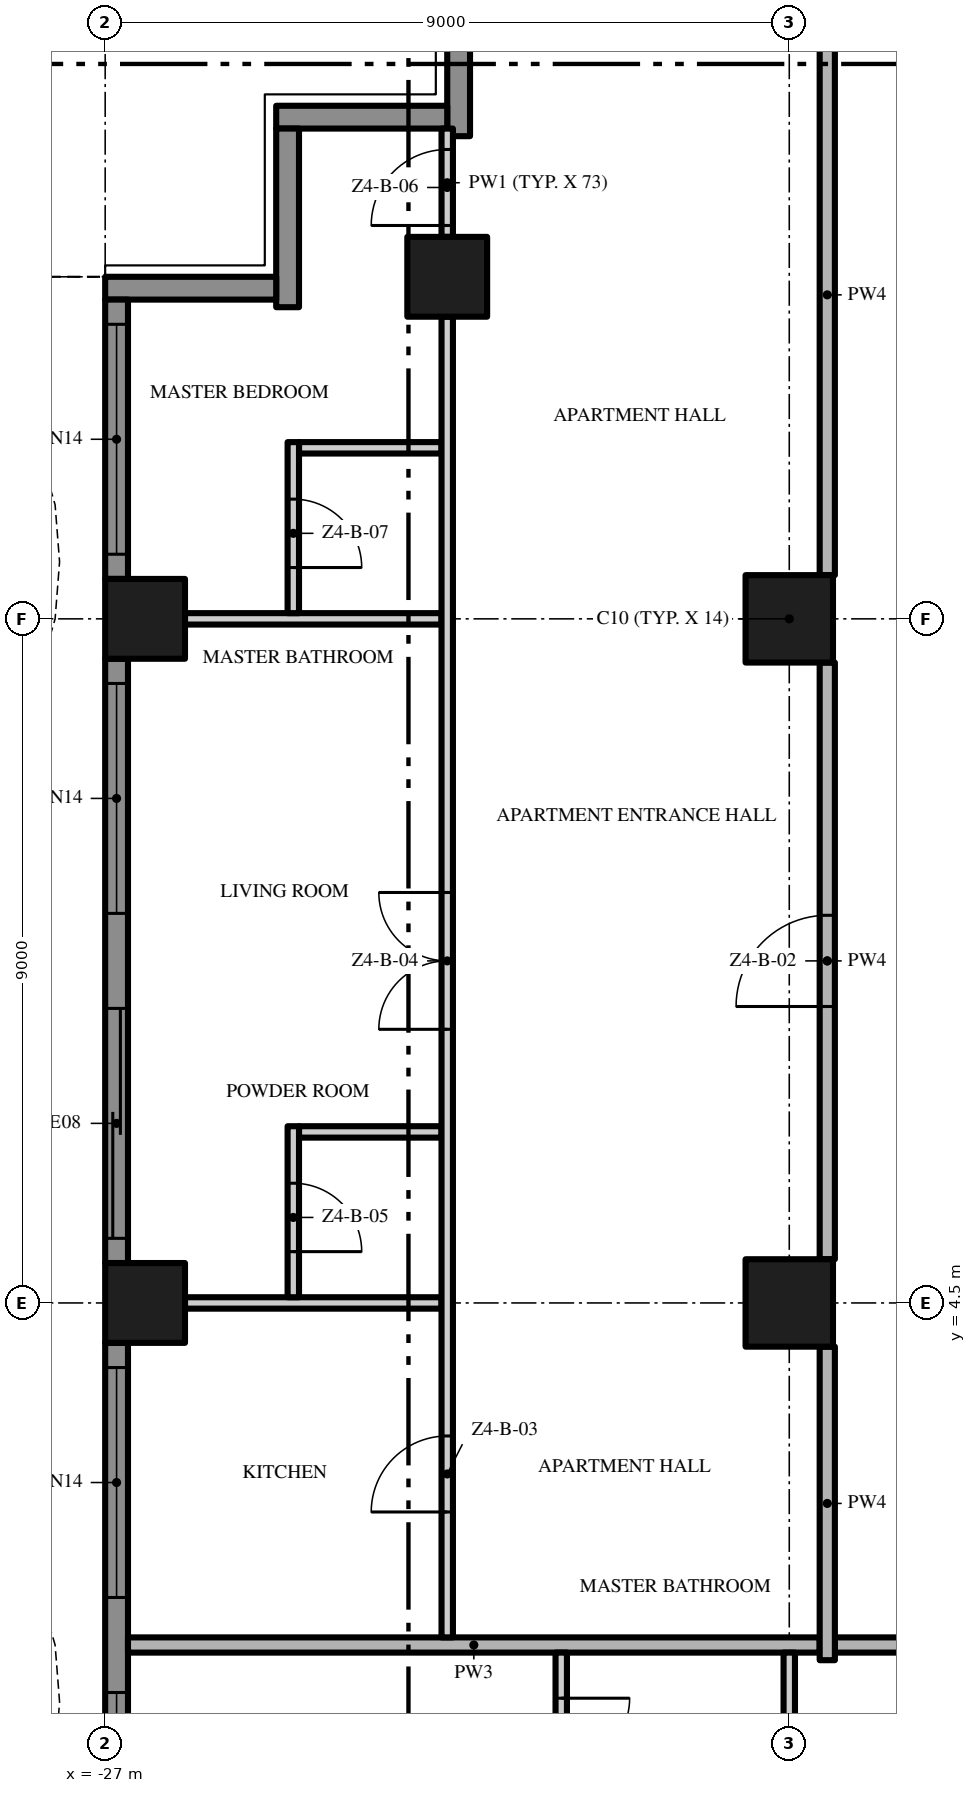
"""IFC4 building model, lengths in metres.
Left out: names, types, materials, properties, quantities, classifications, styles, units other than length and angle.
Written with IfcOpenShell. Run it as: python <this file> out.ifc"""

import sys

from ifc_helpers import new_model, si_unit, direction, frame, frame_2d, origin, origin_2d, place, context, subcontext, project, spatial, polyline, rectangle, outline, extrude, element, fill, save


model = new_model("IFC4")
c1 = context("Model", 3, precision=1e-05, world=origin(), true_north=direction((0.0, 1.0)))
c2 = subcontext(c1, "Body", "Model", "MODEL_VIEW")
j1 = project(units=[si_unit("LENGTHUNIT", "METRE"), si_unit("PLANEANGLEUNIT", "RADIAN")], contexts=[c1])
p1 = place(None, origin())
s1 = spatial("IfcSite", under=j1, at=p1, CompositionType="ELEMENT")
p2 = place(p1, origin())
s2 = spatial("IfcBuilding", under=s1, at=p2, CompositionType="ELEMENT")
p3 = place(p2, frame((0.0, 0.0, 195.8)))
s3 = spatial("IfcBuildingStorey", under=s2, at=p3, CompositionType="ELEMENT", Elevation=195.8)
for number, where, z_axis, x_axis in (
    (1, (-18.0, 13.5, 0.0), (0.0, 0.0, 1.0), (1.0, 0.0, 0.0)),
    (2, (-18.0, 4.5, 0.0), (0.0, 0.0, 1.0), (1.0, 0.0, 0.0)),
):
    element("IfcColumn", number, at=place(p3, frame(where, z_axis=z_axis, x_axis=x_axis)), inside=s3, PredefinedType="COLUMN", context=c2, shape_type="SweptSolid", body=[
        extrude(rectangle(XDim=1.15, YDim=1.15, at=origin_2d()), origin(), (0.0, 0.0, 1.0), 3.5),
    ])
for number, where, z_axis, x_axis in (
    (3, (-26.475, 13.5, 0.0), (0.0, 0.0, 1.0), (1.0, 0.0, 0.0)),
    (4, (-22.5, 18.0, 0.0), (0.0, 0.0, 1.0), (1.0, 0.0, 0.0)),
    (5, (-26.475, 4.5, 0.0), (0.0, 0.0, 1.0), (1.0, 0.0, 0.0)),
):
    element("IfcColumn", number, at=place(p3, frame(where, z_axis=z_axis, x_axis=x_axis)), inside=s3, PredefinedType="COLUMN", context=c2, shape_type="SweptSolid", body=[
        extrude(rectangle(XDim=1.05, YDim=1.05, at=origin_2d()), origin(), (0.0, 0.0, 1.0), 3.5),
    ])
p4 = place(p3, frame((-22.35, 19.85, 0.0), z_axis=(0.0, 0.0, 1.0), x_axis=(0.0, 1.0, 0.0)))
e6 = element("IfcWall", 6, at=p4, inside=s3, PredefinedType="SOLIDWALL", context=c2, shape_type="SweptSolid", body=[
    extrude(rectangle(XDim=2.35, YDim=0.3, at=frame_2d((1.175, 0.0))), origin(), (0.0, 0.0, 1.0), 3.5),
])
p5 = place(p3, frame((-24.75, 20.1, 0.0), z_axis=(0.0, 0.0, 1.0), x_axis=(1.0, 0.0, 0.0)))
e7 = element("IfcWall", 7, at=p5, inside=s3, PredefinedType="SOLIDWALL", context=c2, shape_type="SweptSolid", body=[
    extrude(rectangle(XDim=2.25, YDim=0.3, at=frame_2d((1.125, 0.0))), origin(), (0.0, 0.0, 1.0), 3.5),
])
p6 = place(p3, frame((-24.6, 17.6, 0.0), z_axis=(0.0, 0.0, 1.0), x_axis=(0.0, 1.0, 0.0)))
e8 = element("IfcWall", 8, at=p6, inside=s3, PredefinedType="SOLIDWALL", context=c2, shape_type="SweptSolid", body=[
    extrude(rectangle(XDim=2.35, YDim=0.3, at=frame_2d((1.175, 0.0))), origin(), (0.0, 0.0, 1.0), 3.5),
])
p7 = place(p3, frame((-27.0, 17.85, 0.0), z_axis=(0.0, 0.0, 1.0), x_axis=(1.0, 0.0, 0.0)))
e9 = element("IfcWall", 9, at=p7, inside=s3, PredefinedType="SOLIDWALL", context=c2, shape_type="SweptSolid", body=[
    extrude(rectangle(XDim=2.25, YDim=0.3, at=frame_2d((1.125, 0.0))), origin(), (0.0, 0.0, 1.0), 3.5),
])
p8 = place(p3, frame((-26.85, 14.025, 0.0), z_axis=(0.0, 0.0, 1.0), x_axis=(0.0, 1.0, 0.0)))
e10 = element("IfcWall", 10, at=p8, inside=s3, PredefinedType="SOLIDWALL", context=c2, shape_type="SweptSolid", body=[
    extrude(rectangle(XDim=3.675, YDim=0.3, at=frame_2d((1.837, 0.0))), origin(), (0.0, 0.0, 1.0), 3.5),
])
p9 = place(p8, frame((0.325, 0.0, 0.45)))
e11 = element("IfcOpeningElement", 11, at=p9, cuts=e10, PredefinedType="OPENING", context=c2, shape_type="SweptSolid", body=[
    extrude(rectangle(XDim=3.025, YDim=2.65, at=frame_2d((1.512, 1.325))), frame((0.0, 0.16, 0.0), z_axis=(0.0, -1.0, 0.0), x_axis=(1.0, 0.0, 0.0)), (0.0, 0.0, 1.0), 0.32),
])
p10 = place(p3, frame((-26.85, 5.025, 0.0), z_axis=(0.0, 0.0, 1.0), x_axis=(0.0, 1.0, 0.0)))
e12 = element("IfcWall", 12, at=p10, inside=s3, PredefinedType="SOLIDWALL", context=c2, shape_type="SweptSolid", body=[
    extrude(rectangle(XDim=7.95, YDim=0.3, at=frame_2d((3.975, 0.0))), origin(), (0.0, 0.0, 1.0), 3.5),
])
p11 = place(p10, frame((4.6, 0.0, 0.45)))
e13 = element("IfcOpeningElement", 13, at=p11, cuts=e12, PredefinedType="OPENING", context=c2, shape_type="SweptSolid", body=[
    extrude(rectangle(XDim=3.025, YDim=2.65, at=frame_2d((1.512, 1.325))), frame((0.0, 0.16, 0.0), z_axis=(0.0, -1.0, 0.0), x_axis=(1.0, 0.0, 0.0)), (0.0, 0.0, 1.0), 0.32),
])
p12 = place(p10, frame((0.325, 0.0, 0.0)))
e14 = element("IfcOpeningElement", 14, at=p12, cuts=e12, PredefinedType="OPENING", context=c2, shape_type="SweptSolid", body=[
    extrude(rectangle(XDim=3.025, YDim=2.4, at=frame_2d((1.512, 1.2))), frame((0.0, 0.16, 0.0), z_axis=(0.0, -1.0, 0.0), x_axis=(1.0, 0.0, 0.0)), (0.0, 0.0, 1.0), 0.32),
])
p13 = place(p3, frame((-26.85, -3.975, 0.0), z_axis=(0.0, 0.0, 1.0), x_axis=(0.0, 1.0, 0.0)))
e15 = element("IfcWall", 15, at=p13, inside=s3, PredefinedType="SOLIDWALL", context=c2, shape_type="SweptSolid", body=[
    extrude(rectangle(XDim=7.95, YDim=0.3, at=frame_2d((3.975, 0.0))), origin(), (0.0, 0.0, 1.0), 3.5),
])
p14 = place(p13, frame((4.6, 0.0, 0.45)))
e16 = element("IfcOpeningElement", 16, at=p14, cuts=e15, PredefinedType="OPENING", context=c2, shape_type="SweptSolid", body=[
    extrude(rectangle(XDim=3.025, YDim=2.65, at=frame_2d((1.512, 1.325))), frame((0.0, 0.16, 0.0), z_axis=(0.0, -1.0, 0.0), x_axis=(1.0, 0.0, 0.0)), (0.0, 0.0, 1.0), 0.32),
])
p15 = place(p13, frame((0.325, 0.0, 0.45)))
e17 = element("IfcOpeningElement", 17, at=p15, cuts=e15, PredefinedType="OPENING", context=c2, shape_type="SweptSolid", body=[
    extrude(rectangle(XDim=3.025, YDim=2.65, at=frame_2d((1.512, 1.325))), frame((0.0, 0.16, 0.0), z_axis=(0.0, -1.0, 0.0), x_axis=(1.0, 0.0, 0.0)), (0.0, 0.0, 1.0), 0.32),
])
p16 = place(p3, origin())
e18 = element("IfcWall", 18, at=p16, inside=s3, PredefinedType="USERDEFINED", context=c2, shape_type="SweptSolid", body=[
    extrude(outline(polyline([(-28.8, 18.0), (-28.095, 16.5), (-27.659, 15.0), (-27.6, 14.25), (-27.659, 13.5), (-28.095, 12.0), (-28.8, 10.5), (-29.505, 9.0), (-29.941, 7.5), (-30.0, 6.75), (-29.941, 6.0), (-29.505, 4.5), (-28.8, 3.0), (-28.095, 1.5), (-27.659, 0.0), (-27.6, -0.75), (-27.659, -1.5), (-28.095, -3.0), (-28.8, -4.5), (-29.505, -6.0), (-29.941, -7.5), (-30.0, -8.25), (-29.941, -9.0), (-29.505, -10.5), (-28.8, -12.0), (-28.095, -13.5), (-27.659, -15.0), (-27.6, -15.75), (-27.659, -16.5), (-28.095, -18.0), (-27.855, -18.07), (-27.411, -16.545), (-27.349, -15.75), (-27.411, -14.955), (-27.86, -13.411), (-28.574, -11.894), (-29.271, -10.411), (-29.694, -8.955), (-29.749, -8.25), (-29.694, -7.545), (-29.271, -6.089), (-28.574, -4.606), (-27.86, -3.089), (-27.411, -1.545), (-27.349, -0.75), (-27.411, 0.045), (-27.86, 1.589), (-28.574, 3.106), (-29.271, 4.589), (-29.694, 6.045), (-29.749, 6.75), (-29.694, 7.455), (-29.271, 8.911), (-28.574, 10.394), (-27.86, 11.911), (-27.411, 13.455), (-27.349, 14.25), (-27.411, 15.045), (-27.86, 16.589), (-28.574, 18.106), (-28.8, 18.0)])), origin(), (0.0, 0.0, 1.0), 0.9),
])
p17 = place(p3, frame((-17.4, 0.0, 0.0), z_axis=(0.0, 0.0, 1.0), x_axis=(1.0, 0.0, 0.0)))
e19 = element("IfcWall", 19, at=p17, inside=s3, PredefinedType="PARTITIONING", context=c2, shape_type="SweptSolid", body=[
    extrude(rectangle(XDim=12.8, YDim=0.2, at=frame_2d((6.4, 0.0))), origin(), (0.0, 0.0, 1.0), 3.5),
])
p18 = place(p3, frame((-26.7, 0.0, 0.0), z_axis=(0.0, 0.0, 1.0), x_axis=(1.0, 0.0, 0.0)))
e20 = element("IfcWall", 20, at=p18, inside=s3, PredefinedType="PARTITIONING", context=c2, shape_type="SweptSolid", body=[
    extrude(rectangle(XDim=9.1, YDim=0.2, at=frame_2d((4.55, 0.0))), origin(), (0.0, 0.0, 1.0), 3.5),
])
p19 = place(p3, frame((-25.95, 4.5, 0.0), z_axis=(0.0, 0.0, 1.0), x_axis=(1.0, 0.0, 0.0)))
e21 = element("IfcWall", 21, at=p19, inside=s3, PredefinedType="PARTITIONING", context=c2, shape_type="SweptSolid", body=[
    extrude(rectangle(XDim=3.375, YDim=0.15, at=frame_2d((1.688, 0.0))), origin(), (0.0, 0.0, 1.0), 3.5),
])
p20 = place(p3, frame((-24.45, 6.75, 0.0), z_axis=(0.0, 0.0, 1.0), x_axis=(1.0, 0.0, 0.0)))
e22 = element("IfcWall", 22, at=p20, inside=s3, PredefinedType="PARTITIONING", context=c2, shape_type="SweptSolid", body=[
    extrude(rectangle(XDim=1.875, YDim=0.15, at=frame_2d((0.938, 0.0))), origin(), (0.0, 0.0, 1.0), 3.5),
])
p21 = place(p3, frame((-25.95, 13.5, 0.0), z_axis=(0.0, 0.0, 1.0), x_axis=(1.0, 0.0, 0.0)))
e23 = element("IfcWall", 23, at=p21, inside=s3, PredefinedType="PARTITIONING", context=c2, shape_type="SweptSolid", body=[
    extrude(rectangle(XDim=3.375, YDim=0.15, at=frame_2d((1.688, 0.0))), origin(), (0.0, 0.0, 1.0), 3.5),
])
p22 = place(p3, frame((-24.45, 15.75, 0.0), z_axis=(0.0, 0.0, 1.0), x_axis=(1.0, 0.0, 0.0)))
e24 = element("IfcWall", 24, at=p22, inside=s3, PredefinedType="PARTITIONING", context=c2, shape_type="SweptSolid", body=[
    extrude(rectangle(XDim=1.875, YDim=0.15, at=frame_2d((0.938, 0.0))), origin(), (0.0, 0.0, 1.0), 3.5),
])
p23 = place(p3, frame((-24.525, 6.825, 0.0), z_axis=(0.0, 0.0, 1.0), x_axis=(0.0, -1.0, 0.0)))
e25 = element("IfcWall", 25, at=p23, inside=s3, PredefinedType="PARTITIONING", context=c2, shape_type="SweptSolid", body=[
    extrude(rectangle(XDim=2.25, YDim=0.15, at=frame_2d((1.125, 0.0))), origin(), (0.0, 0.0, 1.0), 3.5),
])
p24 = place(p23, frame((0.75, 0.0, 0.0)))
e26 = element("IfcOpeningElement", 26, at=p24, cuts=e25, PredefinedType="OPENING", context=c2, shape_type="SweptSolid", body=[
    extrude(rectangle(XDim=0.9, YDim=2.1, at=frame_2d((0.45, 1.05))), frame((0.0, 0.085, 0.0), z_axis=(0.0, -1.0, 0.0), x_axis=(1.0, 0.0, 0.0)), (0.0, 0.0, 1.0), 0.17),
])
p25 = place(p3, frame((-24.525, 15.825, 0.0), z_axis=(0.0, 0.0, 1.0), x_axis=(0.0, -1.0, 0.0)))
e27 = element("IfcWall", 27, at=p25, inside=s3, PredefinedType="PARTITIONING", context=c2, shape_type="SweptSolid", body=[
    extrude(rectangle(XDim=2.25, YDim=0.15, at=frame_2d((1.125, 0.0))), origin(), (0.0, 0.0, 1.0), 3.5),
])
p26 = place(p25, frame((0.75, 0.0, 0.0)))
e28 = element("IfcOpeningElement", 28, at=p26, cuts=e27, PredefinedType="OPENING", context=c2, shape_type="SweptSolid", body=[
    extrude(rectangle(XDim=0.9, YDim=2.1, at=frame_2d((0.45, 1.05))), frame((0.0, 0.085, 0.0), z_axis=(0.0, -1.0, 0.0), x_axis=(1.0, 0.0, 0.0)), (0.0, 0.0, 1.0), 0.17),
])
p27 = place(p3, frame((-22.5, 0.1, 0.0), z_axis=(0.0, 0.0, 1.0), x_axis=(0.0, 1.0, 0.0)))
e29 = element("IfcWall", 29, at=p27, inside=s3, PredefinedType="PARTITIONING", context=c2, shape_type="SweptSolid", body=[
    extrude(rectangle(XDim=17.375, YDim=0.15, at=frame_2d((8.688, 0.0))), origin(), (0.0, 0.0, 1.0), 3.5),
])
p28 = place(p27, frame((1.65, 0.0, 0.0)))
e30 = element("IfcOpeningElement", 30, at=p28, cuts=e29, PredefinedType="OPENING", context=c2, shape_type="SweptSolid", body=[
    extrude(rectangle(XDim=1.0, YDim=2.4, at=frame_2d((0.5, 1.2))), frame((0.0, 0.085, 0.0), z_axis=(0.0, -1.0, 0.0), x_axis=(1.0, 0.0, 0.0)), (0.0, 0.0, 1.0), 0.17),
])
p29 = place(p27, frame((8.0, 0.0, 0.0)))
e31 = element("IfcOpeningElement", 31, at=p29, cuts=e29, PredefinedType="OPENING", context=c2, shape_type="SweptSolid", body=[
    extrude(rectangle(XDim=1.8, YDim=2.4, at=frame_2d((0.9, 1.2))), frame((0.0, 0.085, 0.0), z_axis=(0.0, -1.0, 0.0), x_axis=(1.0, 0.0, 0.0)), (0.0, 0.0, 1.0), 0.17),
])
p30 = place(p3, frame((-22.5, 18.525, 0.0), z_axis=(0.0, 0.0, 1.0), x_axis=(0.0, 1.0, 0.0)))
e32 = element("IfcWall", 32, at=p30, inside=s3, PredefinedType="PARTITIONING", context=c2, shape_type="SweptSolid", body=[
    extrude(rectangle(XDim=1.425, YDim=0.15, at=frame_2d((0.713, 0.0))), origin(), (0.0, 0.0, 1.0), 3.5),
])
p31 = place(p30, frame((0.15, 0.0, 0.0)))
e33 = element("IfcOpeningElement", 33, at=p31, cuts=e32, PredefinedType="OPENING", context=c2, shape_type="SweptSolid", body=[
    extrude(rectangle(XDim=1.0, YDim=2.4, at=frame_2d((0.5, 1.2))), frame((0.0, 0.085, 0.0), z_axis=(0.0, -1.0, 0.0), x_axis=(1.0, 0.0, 0.0)), (0.0, 0.0, 1.0), 0.17),
])
p32 = place(p3, frame((-21.0, -0.1, 0.0), z_axis=(0.0, 0.0, 1.0), x_axis=(0.0, -1.0, 0.0)))
e34 = element("IfcWall", 34, at=p32, inside=s3, PredefinedType="PARTITIONING", context=c2, shape_type="SweptSolid", body=[
    extrude(rectangle(XDim=2.225, YDim=0.15, at=frame_2d((1.113, 0.0))), origin(), (0.0, 0.0, 1.0), 3.5),
])
p33 = place(p32, frame((0.6, 0.0, 0.0)))
e35 = element("IfcOpeningElement", 35, at=p33, cuts=e34, PredefinedType="OPENING", context=c2, shape_type="SweptSolid", body=[
    extrude(rectangle(XDim=0.9, YDim=2.1, at=frame_2d((0.45, 1.05))), frame((0.0, 0.085, 0.0), z_axis=(0.0, -1.0, 0.0), x_axis=(1.0, 0.0, 0.0)), (0.0, 0.0, 1.0), 0.17),
])
p34 = place(p3, frame((-18.0, -3.925, 0.0), z_axis=(0.0, 0.0, 1.0), x_axis=(0.0, 1.0, 0.0)))
e36 = element("IfcWall", 36, at=p34, inside=s3, PredefinedType="PARTITIONING", context=c2, shape_type="SweptSolid", body=[
    extrude(rectangle(XDim=3.825, YDim=0.15, at=frame_2d((1.913, 0.0))), origin(), (0.0, 0.0, 1.0), 3.5),
])
p35 = place(p34, frame((0.15, 0.0, 0.0)))
e37 = element("IfcOpeningElement", 37, at=p35, cuts=e36, PredefinedType="OPENING", context=c2, shape_type="SweptSolid", body=[
    extrude(rectangle(XDim=1.0, YDim=2.4, at=frame_2d((0.5, 1.2))), frame((0.0, 0.085, 0.0), z_axis=(0.0, -1.0, 0.0), x_axis=(1.0, 0.0, 0.0)), (0.0, 0.0, 1.0), 0.17),
])
p36 = place(p3, frame((-17.5, -0.2, 0.0), z_axis=(0.0, 0.0, 1.0), x_axis=(0.0, 1.0, 0.0)))
e38 = element("IfcWall", 38, at=p36, inside=s3, PredefinedType="PARTITIONING", context=c2, shape_type="SweptSolid", body=[
    extrude(rectangle(XDim=4.125, YDim=0.2, at=frame_2d((2.062, 0.0))), origin(), (0.0, 0.0, 1.0), 3.5),
])
p37 = place(p3, frame((-17.5, 5.075, 0.0), z_axis=(0.0, 0.0, 1.0), x_axis=(0.0, 1.0, 0.0)))
e39 = element("IfcWall", 39, at=p37, inside=s3, PredefinedType="PARTITIONING", context=c2, shape_type="SweptSolid", body=[
    extrude(rectangle(XDim=7.85, YDim=0.2, at=frame_2d((3.925, 0.0))), origin(), (0.0, 0.0, 1.0), 3.5),
])
p38 = place(p37, frame((3.325, 0.0, 0.0)))
e40 = element("IfcOpeningElement", 40, at=p38, cuts=e39, PredefinedType="OPENING", context=c2, shape_type="SweptSolid", body=[
    extrude(rectangle(XDim=1.2, YDim=2.4, at=frame_2d((0.6, 1.2))), frame((0.0, 0.11, 0.0), z_axis=(0.0, -1.0, 0.0), x_axis=(1.0, 0.0, 0.0)), (0.0, 0.0, 1.0), 0.22),
])
p39 = place(p3, frame((-17.5, 14.075, 0.0), z_axis=(0.0, 0.0, 1.0), x_axis=(0.0, 1.0, 0.0)))
e41 = element("IfcWall", 41, at=p39, inside=s3, PredefinedType="PARTITIONING", context=c2, shape_type="SweptSolid", body=[
    extrude(rectangle(XDim=7.375, YDim=0.2, at=frame_2d((3.688, 0.0))), origin(), (0.0, 0.0, 1.0), 3.5),
])
p40 = place(p9, origin())
e42 = element("IfcWindow", 42, at=p40, inside=s3, PartitioningType="SINGLE_PANEL", PredefinedType="WINDOW", context=c2, shape_type="SweptSolid", body=[
    extrude(rectangle(XDim=3.025, YDim=2.65, at=frame_2d((1.512, 1.325))), frame((0.0, 0.03, 0.0), z_axis=(0.0, -1.0, 0.0), x_axis=(1.0, 0.0, 0.0)), (0.0, 0.0, 1.0), 0.06),
])
fill(e11, e42)
p41 = place(p11, origin())
e43 = element("IfcWindow", 43, at=p41, inside=s3, PartitioningType="SINGLE_PANEL", PredefinedType="WINDOW", context=c2, shape_type="SweptSolid", body=[
    extrude(rectangle(XDim=3.025, YDim=2.65, at=frame_2d((1.512, 1.325))), frame((0.0, 0.03, 0.0), z_axis=(0.0, -1.0, 0.0), x_axis=(1.0, 0.0, 0.0)), (0.0, 0.0, 1.0), 0.06),
])
fill(e13, e43)
p42 = place(p12, origin())
e44 = element("IfcDoor", 44, at=p42, inside=s3, OperationType="SINGLE_SWING_LEFT", PredefinedType="DOOR", context=c2, shape_type="SweptSolid", body=[
    extrude(rectangle(XDim=3.025, YDim=2.4, at=frame_2d((1.512, 1.2))), frame((0.0, 0.025, 0.0), z_axis=(0.0, -1.0, 0.0), x_axis=(1.0, 0.0, 0.0)), (0.0, 0.0, 1.0), 0.05),
])
fill(e14, e44)
p43 = place(p14, origin())
e45 = element("IfcWindow", 45, at=p43, inside=s3, PartitioningType="SINGLE_PANEL", PredefinedType="WINDOW", context=c2, shape_type="SweptSolid", body=[
    extrude(rectangle(XDim=3.025, YDim=2.65, at=frame_2d((1.512, 1.325))), frame((0.0, 0.03, 0.0), z_axis=(0.0, -1.0, 0.0), x_axis=(1.0, 0.0, 0.0)), (0.0, 0.0, 1.0), 0.06),
])
fill(e16, e45)
p44 = place(p15, origin())
e46 = element("IfcWindow", 46, at=p44, inside=s3, PartitioningType="SINGLE_PANEL", PredefinedType="WINDOW", context=c2, shape_type="SweptSolid", body=[
    extrude(rectangle(XDim=3.025, YDim=2.65, at=frame_2d((1.512, 1.325))), frame((0.0, 0.03, 0.0), z_axis=(0.0, -1.0, 0.0), x_axis=(1.0, 0.0, 0.0)), (0.0, 0.0, 1.0), 0.06),
])
fill(e17, e46)
p45 = place(p38, origin())
e47 = element("IfcDoor", 47, at=p45, inside=s3, OperationType="SINGLE_SWING_LEFT", PredefinedType="DOOR", context=c2, shape_type="SweptSolid", body=[
    extrude(rectangle(XDim=1.2, YDim=2.4, at=frame_2d((0.6, 1.2))), frame((0.0, 0.025, 0.0), z_axis=(0.0, -1.0, 0.0), x_axis=(1.0, 0.0, 0.0)), (0.0, 0.0, 1.0), 0.05),
])
fill(e40, e47)
p46 = place(p28, origin())
e48 = element("IfcDoor", 48, at=p46, inside=s3, OperationType="SINGLE_SWING_LEFT", PredefinedType="DOOR", context=c2, shape_type="SweptSolid", body=[
    extrude(rectangle(XDim=1.0, YDim=2.4, at=frame_2d((0.5, 1.2))), frame((0.0, 0.025, 0.0), z_axis=(0.0, -1.0, 0.0), x_axis=(1.0, 0.0, 0.0)), (0.0, 0.0, 1.0), 0.05),
])
fill(e30, e48)
p47 = place(p29, origin())
e49 = element("IfcDoor", 49, at=p47, inside=s3, OperationType="DOUBLE_DOOR_SINGLE_SWING", PredefinedType="DOOR", context=c2, shape_type="SweptSolid", body=[
    extrude(rectangle(XDim=1.8, YDim=2.4, at=frame_2d((0.9, 1.2))), frame((0.0, 0.025, 0.0), z_axis=(0.0, -1.0, 0.0), x_axis=(1.0, 0.0, 0.0)), (0.0, 0.0, 1.0), 0.05),
])
fill(e31, e49)
p48 = place(p24, origin())
e50 = element("IfcDoor", 50, at=p48, inside=s3, OperationType="SINGLE_SWING_RIGHT", PredefinedType="DOOR", context=c2, shape_type="SweptSolid", body=[
    extrude(rectangle(XDim=0.9, YDim=2.1, at=frame_2d((0.45, 1.05))), frame((0.0, 0.025, 0.0), z_axis=(0.0, -1.0, 0.0), x_axis=(1.0, 0.0, 0.0)), (0.0, 0.0, 1.0), 0.05),
])
fill(e26, e50)
p49 = place(p31, origin())
e51 = element("IfcDoor", 51, at=p49, inside=s3, OperationType="SINGLE_SWING_LEFT", PredefinedType="DOOR", context=c2, shape_type="SweptSolid", body=[
    extrude(rectangle(XDim=1.0, YDim=2.4, at=frame_2d((0.5, 1.2))), frame((0.0, 0.025, 0.0), z_axis=(0.0, -1.0, 0.0), x_axis=(1.0, 0.0, 0.0)), (0.0, 0.0, 1.0), 0.05),
])
fill(e33, e51)
p50 = place(p26, origin())
e52 = element("IfcDoor", 52, at=p50, inside=s3, OperationType="SINGLE_SWING_RIGHT", PredefinedType="DOOR", context=c2, shape_type="SweptSolid", body=[
    extrude(rectangle(XDim=0.9, YDim=2.1, at=frame_2d((0.45, 1.05))), frame((0.0, 0.025, 0.0), z_axis=(0.0, -1.0, 0.0), x_axis=(1.0, 0.0, 0.0)), (0.0, 0.0, 1.0), 0.05),
])
fill(e28, e52)
p51 = place(p33, origin())
e53 = element("IfcDoor", 53, at=p51, inside=s3, OperationType="SINGLE_SWING_LEFT", PredefinedType="DOOR", context=c2, shape_type="SweptSolid", body=[
    extrude(rectangle(XDim=0.9, YDim=2.1, at=frame_2d((0.45, 1.05))), frame((0.0, 0.025, 0.0), z_axis=(0.0, -1.0, 0.0), x_axis=(1.0, 0.0, 0.0)), (0.0, 0.0, 1.0), 0.05),
])
fill(e35, e53)
save(model, sys.argv[1])
